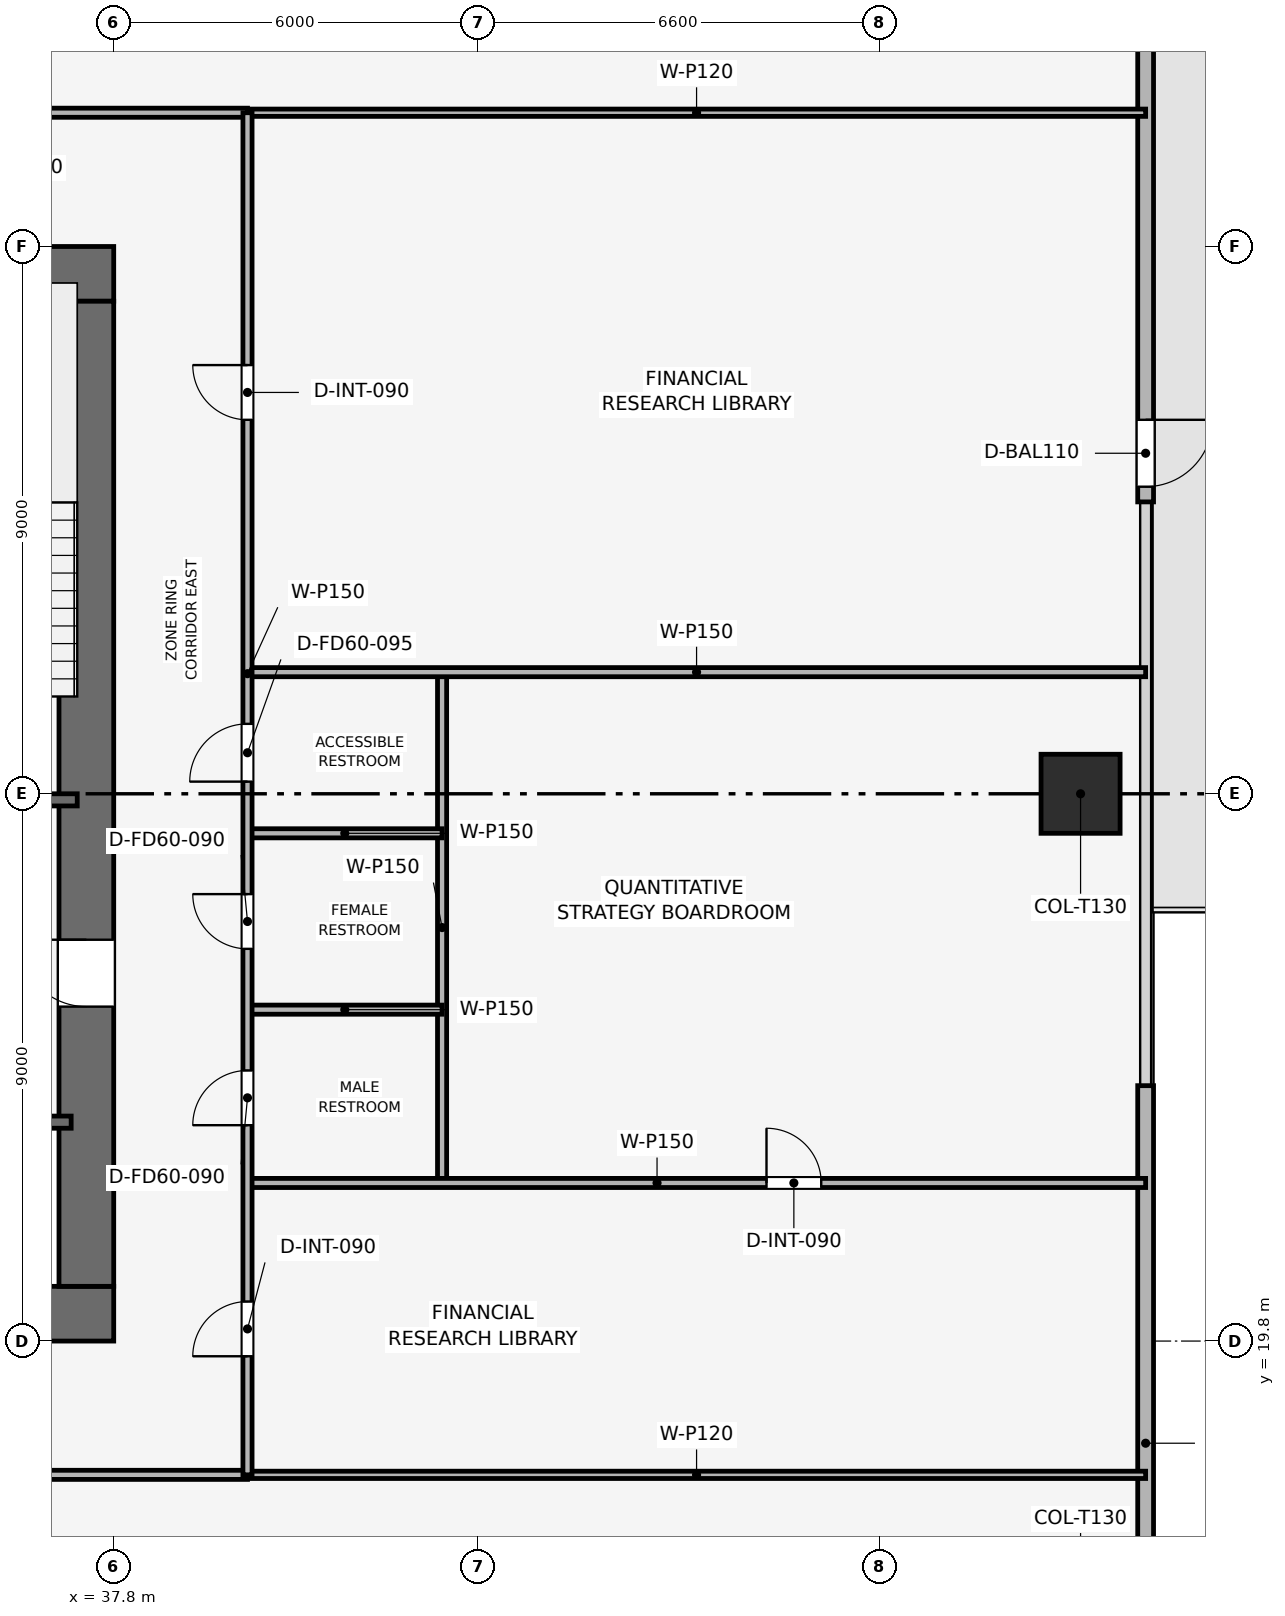
"""IFC4 building model, lengths in metres.
Left out: names, types, materials, properties, quantities, classifications, styles, units other than length and angle.
Written with IfcOpenShell. Run it as: python <this file> out.ifc"""

import sys

from ifc_helpers import new_model, si_unit, direction, frame, frame_2d, origin, origin_2d, place, context, subcontext, project, spatial, rectangle, extrude, element, fill, save


model = new_model("IFC4")
c1 = context("Model", 3, precision=1e-05, world=origin(), true_north=direction((0.0, 1.0)))
c2 = subcontext(c1, "Body", "Model", "MODEL_VIEW")
j1 = project(units=[si_unit("LENGTHUNIT", "METRE"), si_unit("PLANEANGLEUNIT", "RADIAN")], contexts=[c1])
p1 = place(None, origin())
s1 = spatial("IfcSite", under=j1, at=p1, CompositionType="ELEMENT")
p2 = place(p1, origin())
s2 = spatial("IfcBuilding", under=s1, at=p2, CompositionType="ELEMENT")
p3 = place(p2, frame((0.0, 0.0, 129.0)))
s3 = spatial("IfcBuildingStorey", under=s2, at=p3, CompositionType="ELEMENT", Elevation=129.0)
p4 = place(p3, frame((19.8, 20.25, 0.0), z_axis=(0.0, 0.0, 1.0), x_axis=(1.0, 0.0, 0.0)))
e1 = element("IfcWall", 1, at=p4, inside=s3, PredefinedType="SHEAR", context=c2, shape_type="SweptSolid", body=[
    extrude(rectangle(XDim=18.0, YDim=0.9, at=frame_2d((9.0, 0.0))), origin(), (0.0, 0.0, 1.0), 3.9),
])
p5 = place(p4, frame((8.4, 0.0, 0.0)))
e2 = element("IfcOpeningElement", 2, at=p5, cuts=e1, PredefinedType="OPENING", context=c2, shape_type="SweptSolid", body=[
    extrude(rectangle(XDim=1.2, YDim=2.2, at=frame_2d((0.6, 1.1))), frame((0.0, 0.46, 0.0), z_axis=(0.0, -1.0, 0.0), x_axis=(1.0, 0.0, 0.0)), (0.0, 0.0, 1.0), 0.92),
])
p6 = place(p3, frame((19.8, 37.35, 0.0), z_axis=(0.0, 0.0, 1.0), x_axis=(1.0, 0.0, 0.0)))
e3 = element("IfcWall", 3, at=p6, inside=s3, PredefinedType="SHEAR", context=c2, shape_type="SweptSolid", body=[
    extrude(rectangle(XDim=18.0, YDim=0.9, at=frame_2d((9.0, 0.0))), origin(), (0.0, 0.0, 1.0), 3.9),
])
p7 = place(p6, frame((7.05, 0.0, 0.0)))
e4 = element("IfcOpeningElement", 4, at=p7, cuts=e3, PredefinedType="OPENING", context=c2, shape_type="SweptSolid", body=[
    extrude(rectangle(XDim=1.1, YDim=2.15, at=frame_2d((0.55, 1.075))), frame((0.0, 0.46, 0.0), z_axis=(0.0, -1.0, 0.0), x_axis=(1.0, 0.0, 0.0)), (0.0, 0.0, 1.0), 0.92),
])
p8 = place(p3, frame((37.35, 20.7, 0.0), z_axis=(0.0, 0.0, 1.0), x_axis=(0.0, 1.0, 0.0)))
e5 = element("IfcWall", 5, at=p8, inside=s3, PredefinedType="SHEAR", context=c2, shape_type="SweptSolid", body=[
    extrude(rectangle(XDim=16.2, YDim=0.9, at=frame_2d((8.1, 0.0))), origin(), (0.0, 0.0, 1.0), 3.9),
])
p9 = place(p8, frame((4.6, 0.0, 0.0)))
e6 = element("IfcOpeningElement", 6, at=p9, cuts=e5, PredefinedType="OPENING", context=c2, shape_type="SweptSolid", body=[
    extrude(rectangle(XDim=1.1, YDim=2.15, at=frame_2d((0.55, 1.075))), frame((0.0, 0.46, 0.0), z_axis=(0.0, -1.0, 0.0), x_axis=(1.0, 0.0, 0.0)), (0.0, 0.0, 1.0), 0.92),
])
p10 = place(p3, frame((53.7, 28.8, 0.003), z_axis=(0.0, 0.0, 1.0), x_axis=(1.0, 0.0, 0.0)))
e7 = element("IfcColumn", 7, at=p10, inside=s3, PredefinedType="COLUMN", context=c2, shape_type="SweptSolid", body=[
    extrude(rectangle(XDim=1.3, YDim=1.3, at=origin_2d()), origin(), (0.0, 0.0, 1.0), 3.644),
])
p11 = place(p3, frame((54.77, 47.7, 0.0), z_axis=(0.0, 0.0, 1.0), x_axis=(0.0, -1.0, 0.0)))
e8 = element("IfcWall", 8, at=p11, inside=s3, PredefinedType="SOLIDWALL", context=c2, shape_type="SweptSolid", body=[
    extrude(rectangle(XDim=14.1, YDim=0.26, at=frame_2d((7.05, 0.0))), origin(), (0.0, 0.0, 1.0), 3.65),
])
p12 = place(p11, frame((12.75, 0.0, 0.0)))
e9 = element("IfcOpeningElement", 9, at=p12, cuts=e8, PredefinedType="OPENING", context=c2, shape_type="SweptSolid", body=[
    extrude(rectangle(XDim=1.1, YDim=2.2, at=frame_2d((0.55, 1.1))), frame((0.0, 0.14, 0.0), z_axis=(0.0, -1.0, 0.0), x_axis=(1.0, 0.0, 0.0)), (0.0, 0.0, 1.0), 0.28),
])
p13 = place(p3, frame((54.77, 24.0, 0.0), z_axis=(0.0, 0.0, 1.0), x_axis=(0.0, -1.0, 0.0)))
e10 = element("IfcWall", 10, at=p13, inside=s3, PredefinedType="SOLIDWALL", context=c2, shape_type="SweptSolid", body=[
    extrude(rectangle(XDim=14.1, YDim=0.26, at=frame_2d((7.05, 0.0))), origin(), (0.0, 0.0, 1.0), 3.65),
])
p14 = place(p13, frame((11.75, 0.0, 0.72)))
e11 = element("IfcOpeningElement", 11, at=p14, cuts=e10, PredefinedType="OPENING", context=c2, shape_type="SweptSolid", body=[
    extrude(rectangle(XDim=2.1, YDim=2.1, at=frame_2d((1.05, 1.05))), frame((0.0, 0.14, 0.0), z_axis=(0.0, -1.0, 0.0), x_axis=(1.0, 0.0, 0.0)), (0.0, 0.0, 1.0), 0.28),
])
p15 = place(p3, frame((34.05, 28.7, 0.0), z_axis=(0.0, 0.0, 1.0), x_axis=(1.0, 0.0, 0.0)))
e12 = element("IfcWall", 12, at=p15, inside=s3, PredefinedType="SHEAR", context=c2, shape_type="SweptSolid", body=[
    extrude(rectangle(XDim=3.15, YDim=0.2, at=frame_2d((1.575, 0.0))), origin(), (0.0, 0.0, 1.0), 3.65),
])
p16 = place(p15, frame((0.8, 0.0, 0.0)))
e13 = element("IfcOpeningElement", 13, at=p16, cuts=e12, PredefinedType="OPENING", context=c2, shape_type="SweptSolid", body=[
    extrude(rectangle(XDim=1.0, YDim=2.1, at=frame_2d((0.5, 1.05))), frame((0.0, 0.11, 0.0), z_axis=(0.0, -1.0, 0.0), x_axis=(1.0, 0.0, 0.0)), (0.0, 0.0, 1.0), 0.22),
])
p17 = place(p3, frame((34.05, 23.4, 0.0), z_axis=(0.0, 0.0, 1.0), x_axis=(1.0, 0.0, 0.0)))
e14 = element("IfcWall", 14, at=p17, inside=s3, PredefinedType="SHEAR", context=c2, shape_type="SweptSolid", body=[
    extrude(rectangle(XDim=3.05, YDim=0.2, at=frame_2d((1.525, 0.0))), origin(), (0.0, 0.0, 1.0), 3.65),
])
p18 = place(p17, frame((1.2, 0.0, 0.0)))
e15 = element("IfcOpeningElement", 15, at=p18, cuts=e14, PredefinedType="OPENING", context=c2, shape_type="SweptSolid", body=[
    extrude(rectangle(XDim=1.1, YDim=2.15, at=frame_2d((0.55, 1.075))), frame((0.0, 0.11, 0.0), z_axis=(0.0, -1.0, 0.0), x_axis=(1.0, 0.0, 0.0)), (0.0, 0.0, 1.0), 0.22),
])
for number, where, z_axis, x_axis in (
    (16, (40.0, 17.6, 0.0), (0.0, 0.0, 1.0), (1.0, 0.0, 0.0)),
    (17, (40.0, 40.0, 0.0), (0.0, 0.0, 1.0), (1.0, 0.0, 0.0)),
):
    element("IfcWall", number, at=place(p3, frame(where, z_axis=z_axis, x_axis=x_axis)), inside=s3, PredefinedType="PARTITIONING", context=c2, shape_type="SweptSolid", body=[
        extrude(rectangle(XDim=14.77, YDim=0.12, at=frame_2d((7.385, 0.0))), origin(), (0.0, 0.0, 1.0), 2.835),
    ])
p19 = place(p3, frame((43.2, 22.4, 0.0), z_axis=(0.0, 0.0, 1.0), x_axis=(0.0, 1.0, 0.0)))
e18 = element("IfcWall", 18, at=p19, inside=s3, PredefinedType="PARTITIONING", context=c2, shape_type="SweptSolid", body=[
    extrude(rectangle(XDim=8.4, YDim=0.15, at=frame_2d((4.2, 0.0))), origin(), (0.0, 0.0, 1.0), 3.185),
])
p20 = place(p3, frame((40.0, 22.4, 0.0), z_axis=(0.0, 0.0, 1.0), x_axis=(1.0, 0.0, 0.0)))
e19 = element("IfcWall", 19, at=p20, inside=s3, PredefinedType="PARTITIONING", context=c2, shape_type="SweptSolid", body=[
    extrude(rectangle(XDim=14.77, YDim=0.15, at=frame_2d((7.385, 0.0))), origin(), (0.0, 0.0, 1.0), 2.835),
])
p21 = place(p20, frame((8.535, 0.0, 0.0)))
e20 = element("IfcOpeningElement", 20, at=p21, cuts=e19, PredefinedType="OPENING", context=c2, shape_type="SweptSolid", body=[
    extrude(rectangle(XDim=0.9, YDim=2.1, at=frame_2d((0.45, 1.05))), frame((0.0, 0.085, 0.0), z_axis=(0.0, -1.0, 0.0), x_axis=(1.0, 0.0, 0.0)), (0.0, 0.0, 1.0), 0.17),
])
p22 = place(p3, frame((40.0, 30.8, 0.0), z_axis=(0.0, 0.0, 1.0), x_axis=(1.0, 0.0, 0.0)))
e21 = element("IfcWall", 21, at=p22, inside=s3, PredefinedType="PARTITIONING", context=c2, shape_type="SweptSolid", body=[
    extrude(rectangle(XDim=14.77, YDim=0.15, at=frame_2d((7.385, 0.0))), origin(), (0.0, 0.0, 1.0), 2.835),
])
for number, where, z_axis, x_axis in (
    (22, (40.0, 25.25, 0.0), (0.0, 0.0, 1.0), (1.0, 0.0, 0.0)),
    (23, (40.0, 28.15, 0.0), (0.0, 0.0, 1.0), (1.0, 0.0, 0.0)),
):
    element("IfcWall", number, at=place(p3, frame(where, z_axis=z_axis, x_axis=x_axis)), inside=s3, PredefinedType="PARTITIONING", context=c2, shape_type="SweptSolid", body=[
        extrude(rectangle(XDim=3.2, YDim=0.15, at=frame_2d((1.6, 0.0))), origin(), (0.0, 0.0, 1.0), 3.65),
    ])
p23 = place(p3, frame((17.6, 17.6, 0.0), z_axis=(0.0, 0.0, 1.0), x_axis=(1.0, 0.0, 0.0)))
e24 = element("IfcWall", 24, at=p23, inside=s3, PredefinedType="PARTITIONING", context=c2, shape_type="SweptSolid", body=[
    extrude(rectangle(XDim=22.4, YDim=0.15, at=frame_2d((11.2, 0.0))), origin(), (0.0, 0.0, 1.0), 3.185),
])
p24 = place(p23, frame((10.75, 0.0, 0.0)))
e25 = element("IfcOpeningElement", 25, at=p24, cuts=e24, PredefinedType="OPENING", context=c2, shape_type="SweptSolid", body=[
    extrude(rectangle(XDim=0.9, YDim=2.1, at=frame_2d((0.45, 1.05))), frame((0.0, 0.085, 0.0), z_axis=(0.0, -1.0, 0.0), x_axis=(1.0, 0.0, 0.0)), (0.0, 0.0, 1.0), 0.17),
])
p25 = place(p3, frame((17.6, 40.0, 0.0), z_axis=(0.0, 0.0, 1.0), x_axis=(1.0, 0.0, 0.0)))
e26 = element("IfcWall", 26, at=p25, inside=s3, PredefinedType="PARTITIONING", context=c2, shape_type="SweptSolid", body=[
    extrude(rectangle(XDim=22.4, YDim=0.15, at=frame_2d((11.2, 0.0))), origin(), (0.0, 0.0, 1.0), 3.185),
])
p26 = place(p25, frame((0.791, 0.0, 0.0)))
e27 = element("IfcOpeningElement", 27, at=p26, cuts=e26, PredefinedType="OPENING", context=c2, shape_type="SweptSolid", body=[
    extrude(rectangle(XDim=0.9, YDim=2.1, at=frame_2d((0.45, 1.05))), frame((0.0, 0.085, 0.0), z_axis=(0.0, -1.0, 0.0), x_axis=(1.0, 0.0, 0.0)), (0.0, 0.0, 1.0), 0.17),
])
p27 = place(p25, frame((4.914, 0.0, 0.0)))
e28 = element("IfcOpeningElement", 28, at=p27, cuts=e26, PredefinedType="OPENING", context=c2, shape_type="SweptSolid", body=[
    extrude(rectangle(XDim=0.9, YDim=2.1, at=frame_2d((0.45, 1.05))), frame((0.0, 0.085, 0.0), z_axis=(0.0, -1.0, 0.0), x_axis=(1.0, 0.0, 0.0)), (0.0, 0.0, 1.0), 0.17),
])
p28 = place(p25, frame((10.678, 0.0, 0.0)))
e29 = element("IfcOpeningElement", 29, at=p28, cuts=e26, PredefinedType="OPENING", context=c2, shape_type="SweptSolid", body=[
    extrude(rectangle(XDim=0.9, YDim=2.1, at=frame_2d((0.45, 1.05))), frame((0.0, 0.085, 0.0), z_axis=(0.0, -1.0, 0.0), x_axis=(1.0, 0.0, 0.0)), (0.0, 0.0, 1.0), 0.17),
])
p29 = place(p25, frame((17.755, 0.0, 0.0)))
e30 = element("IfcOpeningElement", 30, at=p29, cuts=e26, PredefinedType="OPENING", context=c2, shape_type="SweptSolid", body=[
    extrude(rectangle(XDim=0.9, YDim=2.1, at=frame_2d((0.45, 1.05))), frame((0.0, 0.085, 0.0), z_axis=(0.0, -1.0, 0.0), x_axis=(1.0, 0.0, 0.0)), (0.0, 0.0, 1.0), 0.17),
])
p30 = place(p3, frame((40.0, 17.6, 0.0), z_axis=(0.0, 0.0, 1.0), x_axis=(0.0, 1.0, 0.0)))
e31 = element("IfcWall", 31, at=p30, inside=s3, PredefinedType="PARTITIONING", context=c2, shape_type="SweptSolid", body=[
    extrude(rectangle(XDim=22.4, YDim=0.15, at=frame_2d((11.2, 0.0))), origin(), (0.0, 0.0, 1.0), 3.185),
])
p31 = place(p30, frame((1.95, 0.0, 0.0)))
e32 = element("IfcOpeningElement", 32, at=p31, cuts=e31, PredefinedType="OPENING", context=c2, shape_type="SweptSolid", body=[
    extrude(rectangle(XDim=0.9, YDim=2.1, at=frame_2d((0.45, 1.05))), frame((0.0, 0.085, 0.0), z_axis=(0.0, -1.0, 0.0), x_axis=(1.0, 0.0, 0.0)), (0.0, 0.0, 1.0), 0.17),
])
p32 = place(p30, frame((5.75, 0.0, 0.0)))
e33 = element("IfcOpeningElement", 33, at=p32, cuts=e31, PredefinedType="OPENING", context=c2, shape_type="SweptSolid", body=[
    extrude(rectangle(XDim=0.9, YDim=2.1, at=frame_2d((0.45, 1.05))), frame((0.0, 0.085, 0.0), z_axis=(0.0, -1.0, 0.0), x_axis=(1.0, 0.0, 0.0)), (0.0, 0.0, 1.0), 0.17),
])
p33 = place(p30, frame((8.65, 0.0, 0.0)))
e34 = element("IfcOpeningElement", 34, at=p33, cuts=e31, PredefinedType="OPENING", context=c2, shape_type="SweptSolid", body=[
    extrude(rectangle(XDim=0.9, YDim=2.1, at=frame_2d((0.45, 1.05))), frame((0.0, 0.085, 0.0), z_axis=(0.0, -1.0, 0.0), x_axis=(1.0, 0.0, 0.0)), (0.0, 0.0, 1.0), 0.17),
])
p34 = place(p30, frame((11.4, 0.0, 0.0)))
e35 = element("IfcOpeningElement", 35, at=p34, cuts=e31, PredefinedType="OPENING", context=c2, shape_type="SweptSolid", body=[
    extrude(rectangle(XDim=0.95, YDim=2.1, at=frame_2d((0.475, 1.05))), frame((0.0, 0.085, 0.0), z_axis=(0.0, -1.0, 0.0), x_axis=(1.0, 0.0, 0.0)), (0.0, 0.0, 1.0), 0.17),
])
p35 = place(p30, frame((17.35, 0.0, 0.0)))
e36 = element("IfcOpeningElement", 36, at=p35, cuts=e31, PredefinedType="OPENING", context=c2, shape_type="SweptSolid", body=[
    extrude(rectangle(XDim=0.9, YDim=2.1, at=frame_2d((0.45, 1.05))), frame((0.0, 0.085, 0.0), z_axis=(0.0, -1.0, 0.0), x_axis=(1.0, 0.0, 0.0)), (0.0, 0.0, 1.0), 0.17),
])
p36 = place(p12, origin())
e37 = element("IfcDoor", 37, at=p36, inside=s3, OperationType="SINGLE_SWING_LEFT", PredefinedType="DOOR", context=c2, shape_type="SweptSolid", body=[
    extrude(rectangle(XDim=1.1, YDim=2.2, at=frame_2d((0.55, 1.1))), frame((0.0, 0.025, 0.0), z_axis=(0.0, -1.0, 0.0), x_axis=(1.0, 0.0, 0.0)), (0.0, 0.0, 1.0), 0.05),
])
fill(e9, e37)
p37 = place(p21, origin())
e38 = element("IfcDoor", 38, at=p37, inside=s3, OperationType="SINGLE_SWING_LEFT", PredefinedType="DOOR", context=c2, shape_type="SweptSolid", body=[
    extrude(rectangle(XDim=0.9, YDim=2.1, at=frame_2d((0.45, 1.05))), frame((0.0, 0.025, 0.0), z_axis=(0.0, -1.0, 0.0), x_axis=(1.0, 0.0, 0.0)), (0.0, 0.0, 1.0), 0.05),
])
fill(e20, e38)
p38 = place(p31, origin())
e39 = element("IfcDoor", 39, at=p38, inside=s3, OperationType="SINGLE_SWING_LEFT", PredefinedType="DOOR", context=c2, shape_type="SweptSolid", body=[
    extrude(rectangle(XDim=0.9, YDim=2.1, at=frame_2d((0.45, 1.05))), frame((0.0, 0.025, 0.0), z_axis=(0.0, -1.0, 0.0), x_axis=(1.0, 0.0, 0.0)), (0.0, 0.0, 1.0), 0.05),
])
fill(e32, e39)
p39 = place(p32, origin())
e40 = element("IfcDoor", 40, at=p39, inside=s3, OperationType="SINGLE_SWING_LEFT", PredefinedType="DOOR", context=c2, shape_type="SweptSolid", body=[
    extrude(rectangle(XDim=0.9, YDim=2.1, at=frame_2d((0.45, 1.05))), frame((0.0, 0.025, 0.0), z_axis=(0.0, -1.0, 0.0), x_axis=(1.0, 0.0, 0.0)), (0.0, 0.0, 1.0), 0.05),
])
fill(e33, e40)
p40 = place(p33, origin())
e41 = element("IfcDoor", 41, at=p40, inside=s3, OperationType="SINGLE_SWING_RIGHT", PredefinedType="DOOR", context=c2, shape_type="SweptSolid", body=[
    extrude(rectangle(XDim=0.9, YDim=2.1, at=frame_2d((0.45, 1.05))), frame((0.0, 0.025, 0.0), z_axis=(0.0, -1.0, 0.0), x_axis=(1.0, 0.0, 0.0)), (0.0, 0.0, 1.0), 0.05),
])
fill(e34, e41)
p41 = place(p34, origin())
e42 = element("IfcDoor", 42, at=p41, inside=s3, OperationType="SINGLE_SWING_LEFT", PredefinedType="DOOR", context=c2, shape_type="SweptSolid", body=[
    extrude(rectangle(XDim=0.95, YDim=2.1, at=frame_2d((0.475, 1.05))), frame((0.0, 0.025, 0.0), z_axis=(0.0, -1.0, 0.0), x_axis=(1.0, 0.0, 0.0)), (0.0, 0.0, 1.0), 0.05),
])
fill(e35, e42)
p42 = place(p35, origin())
e43 = element("IfcDoor", 43, at=p42, inside=s3, OperationType="SINGLE_SWING_RIGHT", PredefinedType="DOOR", context=c2, shape_type="SweptSolid", body=[
    extrude(rectangle(XDim=0.9, YDim=2.1, at=frame_2d((0.45, 1.05))), frame((0.0, 0.025, 0.0), z_axis=(0.0, -1.0, 0.0), x_axis=(1.0, 0.0, 0.0)), (0.0, 0.0, 1.0), 0.05),
])
fill(e36, e43)
p43 = place(p9, origin())
e44 = element("IfcDoor", 44, at=p43, inside=s3, OperationType="SINGLE_SWING_RIGHT", PredefinedType="DOOR", context=c2, shape_type="SweptSolid", body=[
    extrude(rectangle(XDim=1.1, YDim=2.15, at=frame_2d((0.55, 1.075))), frame((0.0, 0.025, 0.0), z_axis=(0.0, -1.0, 0.0), x_axis=(1.0, 0.0, 0.0)), (0.0, 0.0, 1.0), 0.05),
])
fill(e6, e44)
save(model, sys.argv[1])
